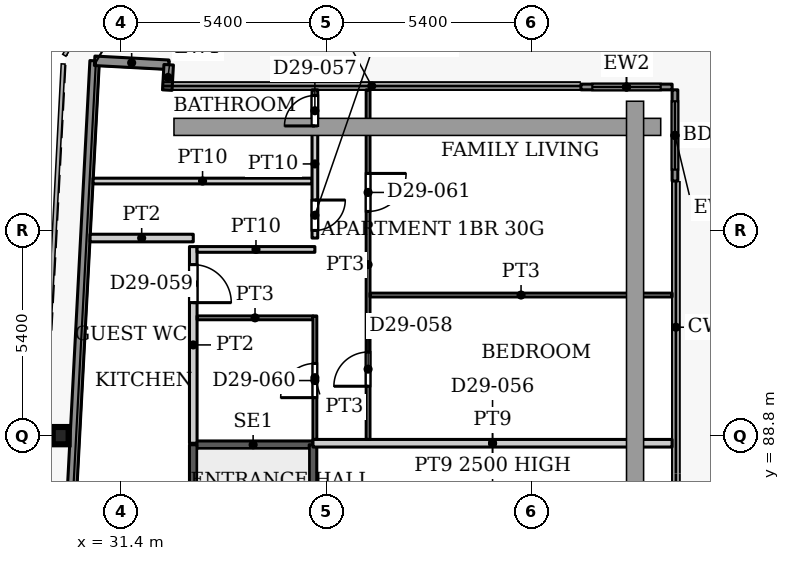
"""IFC4 building model, lengths in metres.
Left out: names, types, materials, properties, quantities, classifications, styles, units other than length and angle.
Written with IfcOpenShell. Run it as: python <this file> out.ifc"""

import sys

from ifc_helpers import new_model, si_unit, direction, frame, frame_2d, origin, origin_2d, place, context, subcontext, project, spatial, rectangle, i_section, extrude, source, transform, mapped, element, fill, save


model = new_model("IFC4")
c1 = context("Model", 3, precision=1e-05, world=origin(), true_north=direction((0.0, 1.0)))
c2 = subcontext(c1, "Body", "Model", "MODEL_VIEW")
j1 = project(units=[si_unit("LENGTHUNIT", "METRE"), si_unit("PLANEANGLEUNIT", "RADIAN")], contexts=[c1])
p1 = place(None, origin())
s1 = spatial("IfcSite", under=j1, at=p1, CompositionType="ELEMENT")
p2 = place(p1, origin())
s2 = spatial("IfcBuilding", under=s1, at=p2, CompositionType="ELEMENT")
p3 = place(p2, frame((0.0, 0.0, 129.2)))
s3 = spatial("IfcBuildingStorey", under=s2, at=p3, CompositionType="ELEMENT", Elevation=129.2)
p4 = place(p3, frame((29.811, 88.8, 0.0), z_axis=(0.0, 0.0, 1.0), x_axis=(1.0, 0.0, 0.0)))
e1 = element("IfcColumn", 1, at=p4, inside=s3, PredefinedType="COLUMN", context=c2, shape_type="SweptSolid", body=[
    extrude(i_section(OverallWidth=0.418, OverallDepth=0.455, WebThickness=0.042, FlangeThickness=0.068, FilletRadius=0.014, at=origin_2d()), origin(), (0.0, 0.0, 1.0), 3.9),
])
p5 = place(p3, frame((27.195, 31.969, 0.0), z_axis=(0.0, 0.0, 1.0), x_axis=(0.052554995867, 0.998618031286, 0.0)))
e2 = element("IfcWall", 2, at=p5, inside=s3, PredefinedType="SOLIDWALL", context=c2, shape_type="SweptSolid", body=[
    extrude(rectangle(XDim=66.787, YDim=0.25, at=frame_2d((33.394, 0.0))), origin(), (0.0, 0.0, 1.0), 3.75),
])
p6 = place(p3, frame((30.705, 98.664, 0.0), z_axis=(0.0, 0.0, 1.0), x_axis=(0.998577785791, -0.053314216913, 0.0)))
e3 = element("IfcWall", 3, at=p6, inside=s3, PredefinedType="SOLIDWALL", context=c2, shape_type="SweptSolid", body=[
    extrude(rectangle(XDim=1.951, YDim=0.25, at=frame_2d((0.975, 0.0))), origin(), (0.0, 0.0, 1.0), 3.75),
])
p7 = place(p3, frame((32.653, 98.56, 0.0), z_axis=(0.0, 0.0, 1.0), x_axis=(-0.054093451632, -0.998535877418, 0.0)))
e4 = element("IfcWall", 4, at=p7, inside=s3, PredefinedType="SOLIDWALL", context=c2, shape_type="SweptSolid", body=[
    extrude(rectangle(XDim=0.668, YDim=0.25, at=frame_2d((0.334, 0.0))), origin(), (0.0, 0.0, 1.0), 3.75),
])
p8 = place(p3, frame((43.5, 97.975, 0.0), z_axis=(0.0, 0.0, 1.0), x_axis=(1.0, 0.0, 0.0)))
e5 = element("IfcWall", 5, at=p8, inside=s3, PredefinedType="SOLIDWALL", context=c2, shape_type="SweptSolid", body=[
    extrude(rectangle(XDim=2.4, YDim=0.15, at=frame_2d((1.2, 0.0))), origin(), (0.0, 0.0, 1.0), 3.75),
])
p9 = place(p8, frame((0.3, 0.0, 0.0)))
e6 = element("IfcOpeningElement", 6, at=p9, cuts=e5, PredefinedType="OPENING", context=c2, shape_type="SweptSolid", body=[
    extrude(rectangle(XDim=1.8, YDim=2.4, at=frame_2d((0.9, 1.2))), frame((0.0, 0.085, 0.0), z_axis=(0.0, -1.0, 0.0), x_axis=(1.0, 0.0, 0.0)), (0.0, 0.0, 1.0), 0.17),
])
p10 = place(p3, frame((45.975, 97.9, 0.0), z_axis=(0.0, 0.0, 1.0), x_axis=(0.0, -1.0, 0.0)))
e7 = element("IfcWall", 7, at=p10, inside=s3, PredefinedType="SOLIDWALL", context=c2, shape_type="SweptSolid", body=[
    extrude(rectangle(XDim=2.4, YDim=0.15, at=frame_2d((1.2, 0.0))), origin(), (0.0, 0.0, 1.0), 3.75),
])
p11 = place(p10, frame((0.3, 0.0, 0.0)))
e8 = element("IfcOpeningElement", 8, at=p11, cuts=e7, PredefinedType="OPENING", context=c2, shape_type="SweptSolid", body=[
    extrude(rectangle(XDim=1.8, YDim=2.4, at=frame_2d((0.9, 1.2))), frame((0.0, 0.085, 0.0), z_axis=(0.0, -1.0, 0.0), x_axis=(1.0, 0.0, 0.0)), (0.0, 0.0, 1.0), 0.17),
])
p12 = place(p3, frame((33.3, 88.56, 0.0), z_axis=(0.0, 0.0, 1.0), x_axis=(1.0, 0.0, 0.0)))
e9 = element("IfcWall", 9, at=p12, inside=s3, PredefinedType="SHEAR", context=c2, shape_type="SweptSolid", body=[
    extrude(rectangle(XDim=3.15, YDim=0.2, at=frame_2d((1.575, 0.0))), origin(), (0.0, 0.0, 1.0), 3.9),
])
p13 = place(p3, frame((33.3, 79.4, 0.0), z_axis=(0.0, 0.0, 1.0), x_axis=(0.0, 1.0, 0.0)))
e10 = element("IfcWall", 10, at=p13, inside=s3, PredefinedType="SHEAR", context=c2, shape_type="SweptSolid", body=[
    extrude(rectangle(XDim=9.16, YDim=0.2, at=frame_2d((4.58, 0.0))), origin(), (0.0, 0.0, 1.0), 3.9),
])
p14 = place(p13, frame((0.35, 0.0, 0.0)))
e11 = element("IfcOpeningElement", 11, at=p14, cuts=e10, PredefinedType="OPENING", context=c2, shape_type="SweptSolid", body=[
    extrude(rectangle(XDim=1.1, YDim=2.2, at=frame_2d((0.55, 1.1))), frame((0.0, 0.11, 0.0), z_axis=(0.0, -1.0, 0.0), x_axis=(1.0, 0.0, 0.0)), (0.0, 0.0, 1.0), 0.22),
])
p15 = place(p3, frame((36.45, 79.4, 0.0), z_axis=(0.0, 0.0, 1.0), x_axis=(0.0, 1.0, 0.0)))
e12 = element("IfcWall", 12, at=p15, inside=s3, PredefinedType="SHEAR", context=c2, shape_type="SweptSolid", body=[
    extrude(rectangle(XDim=9.16, YDim=0.2, at=frame_2d((4.58, 0.0))), origin(), (0.0, 0.0, 1.0), 3.9),
])
p16 = place(p3, frame((30.664, 95.5, 0.0), z_axis=(0.0, 0.0, 1.0), x_axis=(1.0, 0.0, 0.0)))
e13 = element("IfcWall", 13, at=p16, inside=s3, PredefinedType="PARTITIONING", context=c2, shape_type="SweptSolid", body=[
    extrude(rectangle(XDim=5.761, YDim=0.15, at=frame_2d((2.88, 0.0))), origin(), (0.0, 0.0, 1.0), 3.6),
])
p17 = place(p3, frame((30.585, 94.0, 0.0), z_axis=(0.0, 0.0, 1.0), x_axis=(1.0, 0.0, 0.0)))
e14 = element("IfcWall", 14, at=p17, inside=s3, PredefinedType="PARTITIONING", context=c2, shape_type="SweptSolid", body=[
    extrude(rectangle(XDim=2.715, YDim=0.2, at=frame_2d((1.358, 0.0))), origin(), (0.0, 0.0, 1.0), 3.6),
])
p18 = place(p3, frame((33.3, 88.6, 0.0), z_axis=(0.0, 0.0, 1.0), x_axis=(0.0, 1.0, 0.0)))
e15 = element("IfcWall", 15, at=p18, inside=s3, PredefinedType="PARTITIONING", context=c2, shape_type="SweptSolid", body=[
    extrude(rectangle(XDim=5.175, YDim=0.2, at=frame_2d((2.587, 0.0))), origin(), (0.0, 0.0, 1.0), 3.6),
])
p19 = place(p18, frame((3.7, 0.0, 0.0)))
e16 = element("IfcOpeningElement", 16, at=p19, cuts=e15, PredefinedType="OPENING", context=c2, shape_type="SweptSolid", body=[
    extrude(rectangle(XDim=1.0, YDim=2.1, at=frame_2d((0.5, 1.05))), frame((0.0, 0.11, 0.0), z_axis=(0.0, -1.0, 0.0), x_axis=(1.0, 0.0, 0.0)), (0.0, 0.0, 1.0), 0.22),
])
p20 = place(p3, frame((33.4, 91.9, 0.0), z_axis=(0.0, 0.0, 1.0), x_axis=(1.0, 0.0, 0.0)))
e17 = element("IfcWall", 17, at=p20, inside=s3, PredefinedType="PARTITIONING", context=c2, shape_type="SweptSolid", body=[
    extrude(rectangle(XDim=3.05, YDim=0.1, at=frame_2d((1.525, 0.0))), origin(), (0.0, 0.0, 1.0), 3.6),
])
p21 = place(p3, frame((33.4, 93.7, 0.0), z_axis=(0.0, 0.0, 1.0), x_axis=(1.0, 0.0, 0.0)))
e18 = element("IfcWall", 18, at=p21, inside=s3, PredefinedType="PARTITIONING", context=c2, shape_type="SweptSolid", body=[
    extrude(rectangle(XDim=3.1, YDim=0.15, at=frame_2d((1.55, 0.0))), origin(), (0.0, 0.0, 1.0), 3.6),
])
p22 = place(p3, frame((36.45, 88.6, 0.0), z_axis=(0.0, 0.0, 1.0), x_axis=(1.0, 0.0, 0.0)))
e19 = element("IfcWall", 19, at=p22, inside=s3, PredefinedType="PARTITIONING", context=c2, shape_type="SweptSolid", body=[
    extrude(rectangle(XDim=9.45, YDim=0.2, at=frame_2d((4.725, 0.0))), origin(), (0.0, 0.0, 1.0), 2.5),
])
p23 = place(p3, frame((36.5, 88.7, 0.0), z_axis=(0.0, 0.0, 1.0), x_axis=(0.0, 1.0, 0.0)))
e20 = element("IfcWall", 20, at=p23, inside=s3, PredefinedType="PARTITIONING", context=c2, shape_type="SweptSolid", body=[
    extrude(rectangle(XDim=3.25, YDim=0.1, at=frame_2d((1.625, 0.0))), origin(), (0.0, 0.0, 1.0), 3.6),
])
p24 = place(p23, frame((1.1, 0.0, 0.0)))
e21 = element("IfcOpeningElement", 21, at=p24, cuts=e20, PredefinedType="OPENING", context=c2, shape_type="SweptSolid", body=[
    extrude(rectangle(XDim=0.9, YDim=2.1, at=frame_2d((0.45, 1.05))), frame((0.0, 0.06, 0.0), z_axis=(0.0, -1.0, 0.0), x_axis=(1.0, 0.0, 0.0)), (0.0, 0.0, 1.0), 0.12),
])
p25 = place(p3, frame((36.5, 94.0, 0.0), z_axis=(0.0, 0.0, 1.0), x_axis=(0.0, 1.0, 0.0)))
e22 = element("IfcWall", 22, at=p25, inside=s3, PredefinedType="PARTITIONING", context=c2, shape_type="SweptSolid", body=[
    extrude(rectangle(XDim=3.9, YDim=0.15, at=frame_2d((1.95, 0.0))), origin(), (0.0, 0.0, 1.0), 3.6),
])
p26 = place(p25, frame((2.95, 0.0, 0.0)))
e23 = element("IfcOpeningElement", 23, at=p26, cuts=e22, PredefinedType="OPENING", context=c2, shape_type="SweptSolid", body=[
    extrude(rectangle(XDim=0.8, YDim=2.1, at=frame_2d((0.4, 1.05))), frame((0.0, 0.085, 0.0), z_axis=(0.0, -1.0, 0.0), x_axis=(1.0, 0.0, 0.0)), (0.0, 0.0, 1.0), 0.17),
])
p27 = place(p25, frame((0.2, 0.0, 0.0)))
e24 = element("IfcOpeningElement", 24, at=p27, cuts=e22, PredefinedType="OPENING", context=c2, shape_type="SweptSolid", body=[
    extrude(rectangle(XDim=0.8, YDim=2.1, at=frame_2d((0.4, 1.05))), frame((0.0, 0.085, 0.0), z_axis=(0.0, -1.0, 0.0), x_axis=(1.0, 0.0, 0.0)), (0.0, 0.0, 1.0), 0.17),
])
p28 = place(p3, frame((37.9, 88.7, 0.0), z_axis=(0.0, 0.0, 1.0), x_axis=(0.0, 1.0, 0.0)))
e25 = element("IfcWall", 25, at=p28, inside=s3, PredefinedType="PARTITIONING", context=c2, shape_type="SweptSolid", body=[
    extrude(rectangle(XDim=9.2, YDim=0.1, at=frame_2d((4.6, 0.0))), origin(), (0.0, 0.0, 1.0), 3.6),
])
p29 = place(p28, frame((1.4, 0.0, 0.0)))
e26 = element("IfcOpeningElement", 26, at=p29, cuts=e25, PredefinedType="OPENING", context=c2, shape_type="SweptSolid", body=[
    extrude(rectangle(XDim=0.9, YDim=2.1, at=frame_2d((0.45, 1.05))), frame((0.0, 0.06, 0.0), z_axis=(0.0, -1.0, 0.0), x_axis=(1.0, 0.0, 0.0)), (0.0, 0.0, 1.0), 0.12),
])
p30 = place(p28, frame((6.0, 0.0, 0.0)))
e27 = element("IfcOpeningElement", 27, at=p30, cuts=e25, PredefinedType="OPENING", context=c2, shape_type="SweptSolid", body=[
    extrude(rectangle(XDim=1.0, YDim=2.1, at=frame_2d((0.5, 1.05))), frame((0.0, 0.06, 0.0), z_axis=(0.0, -1.0, 0.0), x_axis=(1.0, 0.0, 0.0)), (0.0, 0.0, 1.0), 0.12),
])
p31 = place(p3, frame((37.95, 92.5, 0.0), z_axis=(0.0, 0.0, 1.0), x_axis=(1.0, 0.0, 0.0)))
e28 = element("IfcWall", 28, at=p31, inside=s3, PredefinedType="PARTITIONING", context=c2, shape_type="SweptSolid", body=[
    extrude(rectangle(XDim=7.95, YDim=0.1, at=frame_2d((3.975, 0.0))), origin(), (0.0, 0.0, 1.0), 3.6),
])
m1 = source(origin(), c2, "Body", "SweptSolid", [
    extrude(rectangle(XDim=1.8, YDim=2.4, at=frame_2d((0.9, 1.2))), frame((0.0, 0.025, 0.0), z_axis=(0.0, -1.0, 0.0), x_axis=(1.0, 0.0, 0.0)), (0.0, 0.0, 1.0), 0.05),
])
p32 = place(p9, origin())
e29 = element("IfcDoor", 29, at=p32, inside=s3, OperationType="SLIDING_TO_LEFT", PredefinedType="DOOR", context=c2, shape_type="MappedRepresentation", body=[
    mapped(m1, transform((0.0, 0.0, 0.0), x_axis=(1.0, 0.0, 0.0), y_axis=(0.0, 1.0, 0.0), z_axis=(0.0, 0.0, 1.0), scale=1.0)),
])
fill(e6, e29)
p33 = place(p11, origin())
e30 = element("IfcDoor", 30, at=p33, inside=s3, OperationType="SLIDING_TO_LEFT", PredefinedType="DOOR", context=c2, shape_type="MappedRepresentation", body=[
    mapped(m1, transform((0.0, 0.0, 0.0), x_axis=(1.0, 0.0, 0.0), y_axis=(0.0, 1.0, 0.0), z_axis=(0.0, 0.0, 1.0), scale=1.0)),
])
fill(e8, e30)
m2 = source(origin(), c2, "Body", "SweptSolid", [
    extrude(rectangle(XDim=0.8, YDim=2.1, at=frame_2d((0.4, 1.05))), frame((0.0, 0.025, 0.0), z_axis=(0.0, -1.0, 0.0), x_axis=(1.0, 0.0, 0.0)), (0.0, 0.0, 1.0), 0.05),
])
p34 = place(p26, origin())
e31 = element("IfcDoor", 31, at=p34, inside=s3, OperationType="SINGLE_SWING_LEFT", PredefinedType="DOOR", context=c2, shape_type="MappedRepresentation", body=[
    mapped(m2, transform((0.0, 0.0, 0.0), x_axis=(1.0, 0.0, 0.0), y_axis=(0.0, 1.0, 0.0), z_axis=(0.0, 0.0, 1.0), scale=1.0)),
])
fill(e23, e31)
m3 = source(origin(), c2, "Body", "SweptSolid", [
    extrude(rectangle(XDim=0.9, YDim=2.1, at=frame_2d((0.45, 1.05))), frame((0.0, 0.025, 0.0), z_axis=(0.0, -1.0, 0.0), x_axis=(1.0, 0.0, 0.0)), (0.0, 0.0, 1.0), 0.05),
])
p35 = place(p29, origin())
e32 = element("IfcDoor", 32, at=p35, inside=s3, OperationType="SINGLE_SWING_LEFT", PredefinedType="DOOR", context=c2, shape_type="MappedRepresentation", body=[
    mapped(m3, transform((0.0, 0.0, 0.0), x_axis=(1.0, 0.0, 0.0), y_axis=(0.0, 1.0, 0.0), z_axis=(0.0, 0.0, 1.0), scale=1.0)),
])
fill(e26, e32)
m4 = source(origin(), c2, "Body", "SweptSolid", [
    extrude(rectangle(XDim=1.0, YDim=2.1, at=frame_2d((0.5, 1.05))), frame((0.0, 0.025, 0.0), z_axis=(0.0, -1.0, 0.0), x_axis=(1.0, 0.0, 0.0)), (0.0, 0.0, 1.0), 0.05),
])
p36 = place(p19, origin())
e33 = element("IfcDoor", 33, at=p36, inside=s3, OperationType="SINGLE_SWING_RIGHT", PredefinedType="DOOR", context=c2, shape_type="MappedRepresentation", body=[
    mapped(m4, transform((0.0, 0.0, 0.0), x_axis=(1.0, 0.0, 0.0), y_axis=(0.0, 1.0, 0.0), z_axis=(0.0, 0.0, 1.0), scale=1.0)),
])
fill(e16, e33)
p37 = place(p24, origin())
e34 = element("IfcDoor", 34, at=p37, inside=s3, OperationType="SINGLE_SWING_LEFT", PredefinedType="DOOR", context=c2, shape_type="MappedRepresentation", body=[
    mapped(m3, transform((0.0, 0.0, 0.0), x_axis=(1.0, 0.0, 0.0), y_axis=(0.0, 1.0, 0.0), z_axis=(0.0, 0.0, 1.0), scale=1.0)),
])
fill(e21, e34)
m5 = source(origin(), c2, "Body", "SweptSolid", [
    extrude(rectangle(XDim=1.0, YDim=2.1, at=frame_2d((0.5, 1.05))), frame((0.0, 0.025, 0.0), z_axis=(0.0, -1.0, 0.0), x_axis=(1.0, 0.0, 0.0)), (0.0, 0.0, 1.0), 0.05),
])
p38 = place(p30, origin())
e35 = element("IfcDoor", 35, at=p38, inside=s3, OperationType="SINGLE_SWING_RIGHT", PredefinedType="DOOR", context=c2, shape_type="MappedRepresentation", body=[
    mapped(m5, transform((0.0, 0.0, 0.0), x_axis=(1.0, 0.0, 0.0), y_axis=(0.0, 1.0, 0.0), z_axis=(0.0, 0.0, 1.0), scale=1.0)),
])
fill(e27, e35)
p39 = place(p27, origin())
e36 = element("IfcDoor", 36, at=p39, inside=s3, OperationType="SINGLE_SWING_RIGHT", PredefinedType="DOOR", context=c2, shape_type="MappedRepresentation", body=[
    mapped(m2, transform((0.0, 0.0, 0.0), x_axis=(1.0, 0.0, 0.0), y_axis=(0.0, 1.0, 0.0), z_axis=(0.0, 0.0, 1.0), scale=1.0)),
])
fill(e24, e36)
save(model, sys.argv[1])
